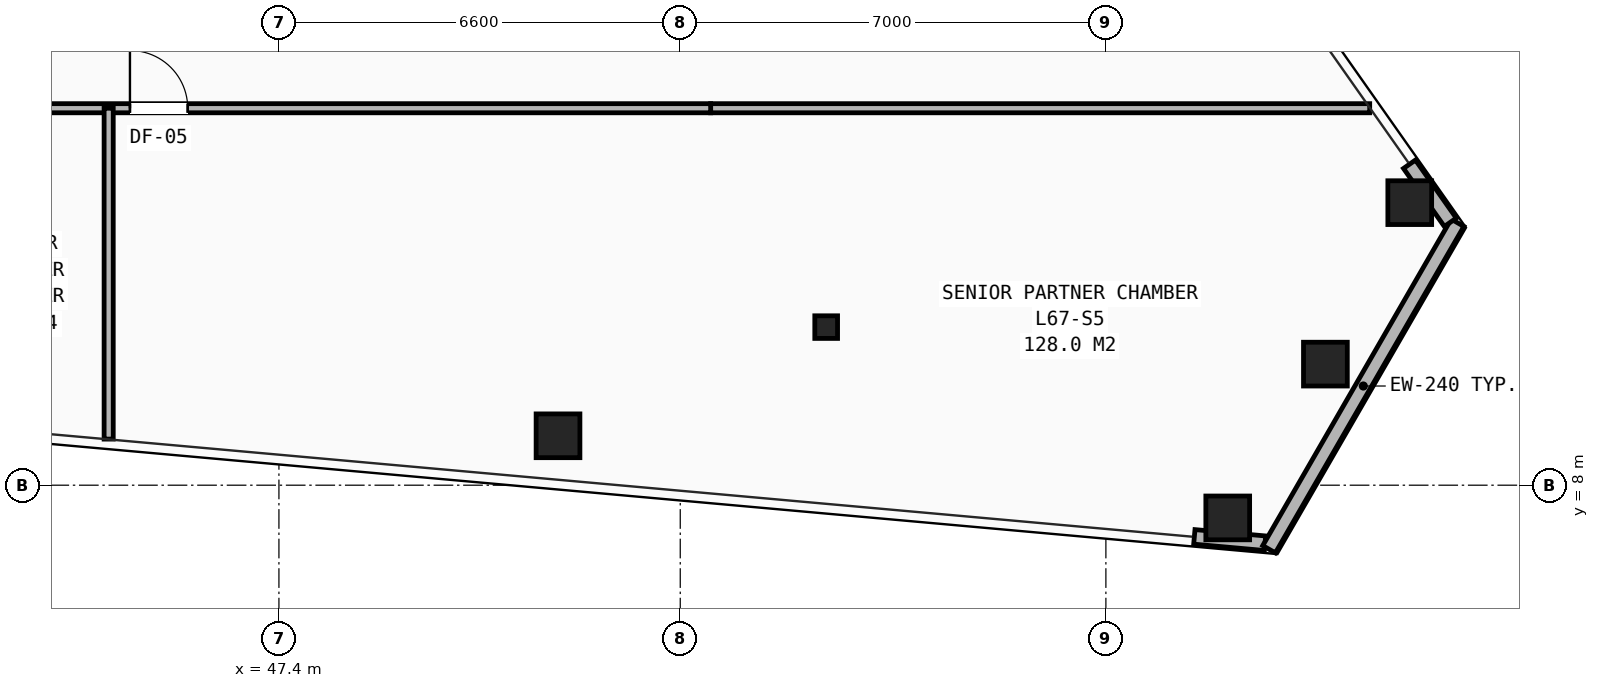
"""IFC4 building model, lengths in metres.
Left out: names, types, materials, properties, quantities, classifications, styles, units other than length and angle.
Written with IfcOpenShell. Run it as: python <this file> out.ifc"""

import sys

from ifc_helpers import new_model, si_unit, direction, frame, frame_2d, origin, origin_2d, place, context, subcontext, project, spatial, rectangle, hollow_rectangle, i_section, extrude, element, fill, save


model = new_model("IFC4")
c1 = context("Model", 3, precision=1e-05, world=origin(), true_north=direction((0.0, 1.0)))
c2 = subcontext(c1, "Body", "Model", "MODEL_VIEW")
j1 = project(units=[si_unit("LENGTHUNIT", "METRE"), si_unit("PLANEANGLEUNIT", "RADIAN")], contexts=[c1])
p1 = place(None, origin())
s1 = spatial("IfcSite", under=j1, at=p1, CompositionType="ELEMENT")
p2 = place(p1, origin())
s2 = spatial("IfcBuilding", under=s1, at=p2, CompositionType="ELEMENT")
p3 = place(p2, frame((0.0, 0.0, 236.4)))
s3 = spatial("IfcBuildingStorey", under=s2, at=p3, CompositionType="ELEMENT", Elevation=236.4)
p4 = place(p3, frame((56.4, 10.6, 0.0), z_axis=(0.0, 0.0, 1.0), x_axis=(1.0, 0.0, 0.0)))
e1 = element("IfcColumn", 1, at=p4, inside=s3, PredefinedType="COLUMN", context=c2, shape_type="SweptSolid", body=[
    extrude(i_section(OverallWidth=0.374, OverallDepth=0.372, WebThickness=0.016, FlangeThickness=0.026, at=origin_2d()), origin(), (0.0, 0.0, 1.0), 3.5),
])
for number, where, z_axis, x_axis in (
    (2, (51.99, 8.812, 0.0), (0.0, 0.0, 1.0), (1.0, 0.0, 0.0)),
    (3, (63.004, 7.462, 0.0), (0.0, 0.0, 1.0), (1.0, 0.0, 0.0)),
    (4, (64.61, 9.991, 0.0), (0.0, 0.0, 1.0), (1.0, 0.0, 0.0)),
    (5, (65.997, 12.647, 0.0), (0.0, 0.0, 1.0), (1.0, 0.0, 0.0)),
):
    element("IfcColumn", number, at=place(p3, frame(where, z_axis=z_axis, x_axis=x_axis)), inside=s3, PredefinedType="COLUMN", context=c2, shape_type="SweptSolid", body=[
        extrude(hollow_rectangle(XDim=0.72, YDim=0.72, WallThickness=0.05, at=origin_2d()), origin(), (0.0, 0.0, 1.0), 3.5),
    ])
p5 = place(p3, frame((62.455, 7.15, 0.0), z_axis=(0.0, 0.0, 1.0), x_axis=(0.996005555759, -0.08929128119, 0.0)))
e6 = element("IfcWall", 6, at=p5, inside=s3, PredefinedType="SHEAR", context=c2, shape_type="SweptSolid", body=[
    extrude(rectangle(XDim=1.167, YDim=0.24, at=frame_2d((0.584, 0.0))), origin(), (0.0, 0.0, 1.0), 2.623),
])
p6 = place(p3, frame((66.784, 12.316, 0.0), z_axis=(0.0, 0.0, 1.0), x_axis=(-0.500009909098, -0.866019682689, 0.0)))
e7 = element("IfcWall", 7, at=p6, inside=s3, PredefinedType="SHEAR", context=c2, shape_type="SweptSolid", body=[
    extrude(rectangle(XDim=6.2, YDim=0.24, at=frame_2d((3.1, 0.0))), origin(), (0.0, 0.0, 1.0), 2.623),
])
p7 = place(p3, frame((66.665, 12.324, 0.0), z_axis=(0.0, 0.0, 1.0), x_axis=(-0.575467507086, 0.817824643972, 0.0)))
e8 = element("IfcWall", 8, at=p7, inside=s3, PredefinedType="SHEAR", context=c2, shape_type="SweptSolid", body=[
    extrude(rectangle(XDim=1.167, YDim=0.24, at=frame_2d((0.584, 0.0))), origin(), (0.0, 0.0, 1.0), 2.623),
])
p8 = place(p3, frame((54.5, 14.2, 0.0), z_axis=(0.0, 0.0, 1.0), x_axis=(1.0, 0.0, 0.0)))
e9 = element("IfcWall", 9, at=p8, inside=s3, PredefinedType="PARTITIONING", context=c2, shape_type="SweptSolid", body=[
    extrude(rectangle(XDim=10.839, YDim=0.15, at=frame_2d((5.419, 0.0))), origin(), (0.0, 0.0, 1.0), 2.292),
])
p9 = place(p3, frame((25.5, 14.2, 0.0), z_axis=(0.0, 0.0, 1.0), x_axis=(1.0, 0.0, 0.0)))
e10 = element("IfcWall", 10, at=p9, inside=s3, PredefinedType="PARTITIONING", context=c2, shape_type="SweptSolid", body=[
    extrude(rectangle(XDim=29.0, YDim=0.15, at=frame_2d((14.5, 0.0))), origin(), (0.0, 0.0, 1.0), 2.292),
])
p10 = place(p9, frame((0.85, 0.0, 0.0)))
e11 = element("IfcOpeningElement", 11, at=p10, cuts=e10, PredefinedType="OPENING", context=c2, shape_type="SweptSolid", body=[
    extrude(rectangle(XDim=0.95, YDim=2.1, at=frame_2d((0.475, 1.05))), frame((0.0, 0.085, 0.0), z_axis=(0.0, -1.0, 0.0), x_axis=(1.0, 0.0, 0.0)), (0.0, 0.0, 1.0), 0.17),
])
p11 = place(p9, frame((8.05, 0.0, 0.0)))
e12 = element("IfcOpeningElement", 12, at=p11, cuts=e10, PredefinedType="OPENING", context=c2, shape_type="SweptSolid", body=[
    extrude(rectangle(XDim=0.95, YDim=2.1, at=frame_2d((0.475, 1.05))), frame((0.0, 0.085, 0.0), z_axis=(0.0, -1.0, 0.0), x_axis=(1.0, 0.0, 0.0)), (0.0, 0.0, 1.0), 0.17),
])
p12 = place(p9, frame((12.35, 0.0, 0.0)))
e13 = element("IfcOpeningElement", 13, at=p12, cuts=e10, PredefinedType="OPENING", context=c2, shape_type="SweptSolid", body=[
    extrude(rectangle(XDim=0.95, YDim=2.1, at=frame_2d((0.475, 1.05))), frame((0.0, 0.085, 0.0), z_axis=(0.0, -1.0, 0.0), x_axis=(1.0, 0.0, 0.0)), (0.0, 0.0, 1.0), 0.17),
])
p13 = place(p9, frame((16.65, 0.0, 0.0)))
e14 = element("IfcOpeningElement", 14, at=p13, cuts=e10, PredefinedType="OPENING", context=c2, shape_type="SweptSolid", body=[
    extrude(rectangle(XDim=0.95, YDim=2.1, at=frame_2d((0.475, 1.05))), frame((0.0, 0.085, 0.0), z_axis=(0.0, -1.0, 0.0), x_axis=(1.0, 0.0, 0.0)), (0.0, 0.0, 1.0), 0.17),
])
p14 = place(p9, frame((19.45, 0.0, 0.0)))
e15 = element("IfcOpeningElement", 15, at=p14, cuts=e10, PredefinedType="OPENING", context=c2, shape_type="SweptSolid", body=[
    extrude(rectangle(XDim=0.95, YDim=2.1, at=frame_2d((0.475, 1.05))), frame((0.0, 0.085, 0.0), z_axis=(0.0, -1.0, 0.0), x_axis=(1.0, 0.0, 0.0)), (0.0, 0.0, 1.0), 0.17),
])
p15 = place(p3, frame((44.6, 8.758, 0.0), z_axis=(0.0, 0.0, 1.0), x_axis=(0.0, 1.0, 0.0)))
e16 = element("IfcWall", 16, at=p15, inside=s3, PredefinedType="PARTITIONING", context=c2, shape_type="SweptSolid", body=[
    extrude(rectangle(XDim=5.442, YDim=0.15, at=frame_2d((2.721, 0.0))), origin(), (0.0, 0.0, 1.0), 2.628),
])
p16 = place(p14, origin())
e17 = element("IfcDoor", 17, at=p16, inside=s3, OperationType="SINGLE_SWING_LEFT", PredefinedType="DOOR", context=c2, shape_type="SweptSolid", body=[
    extrude(rectangle(XDim=0.95, YDim=2.1, at=frame_2d((0.475, 1.05))), frame((0.0, 0.025, 0.0), z_axis=(0.0, -1.0, 0.0), x_axis=(1.0, 0.0, 0.0)), (0.0, 0.0, 1.0), 0.05),
])
fill(e15, e17)
save(model, sys.argv[1])
